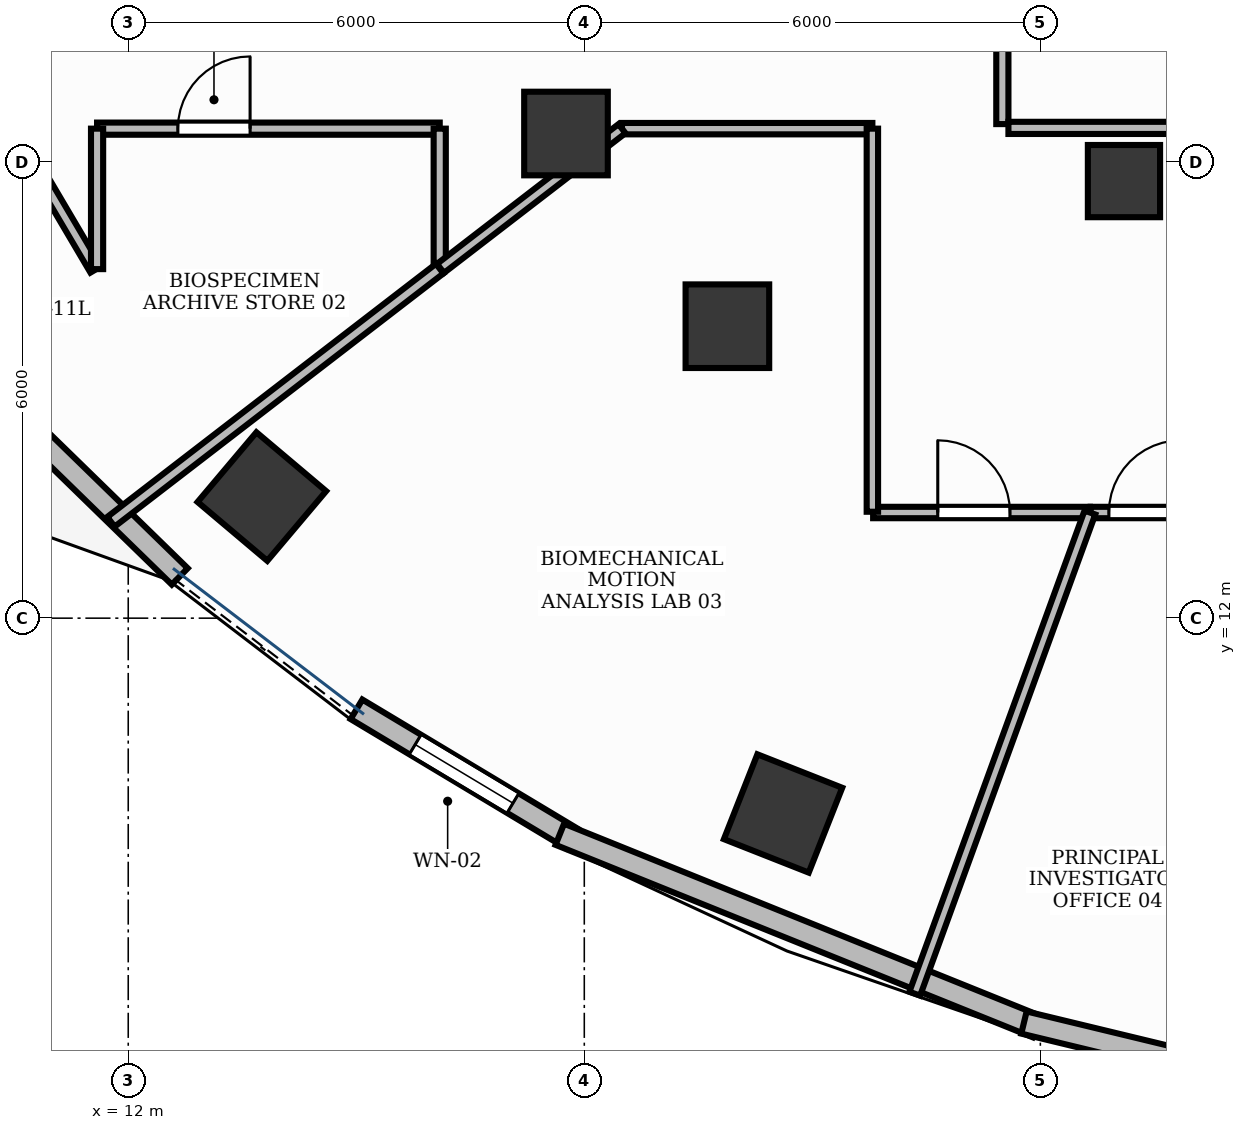
"""IFC4 building model, lengths in metres.
Left out: names, types, materials, properties, quantities, classifications, styles, units other than length and angle.
Written with IfcOpenShell. Run it as: python <this file> out.ifc"""

import sys

from ifc_helpers import new_model, si_unit, direction, frame, frame_2d, origin, origin_2d, place, context, subcontext, project, spatial, rectangle, extrude, element, fill, save


model = new_model("IFC4")
c1 = context("Model", 3, precision=1e-05, world=origin(), true_north=direction((0.0, 1.0)))
c2 = subcontext(c1, "Body", "Model", "MODEL_VIEW")
j1 = project(units=[si_unit("LENGTHUNIT", "METRE"), si_unit("PLANEANGLEUNIT", "RADIAN")], contexts=[c1])
p1 = place(None, origin())
s1 = spatial("IfcSite", under=j1, at=p1, CompositionType="ELEMENT")
p2 = place(p1, origin())
s2 = spatial("IfcBuilding", under=s1, at=p2, CompositionType="ELEMENT")
p3 = place(p2, frame((0.0, 0.0, 115.2)))
s3 = spatial("IfcBuildingStorey", under=s2, at=p3, CompositionType="ELEMENT", Elevation=115.2)
p4 = place(p3, frame((25.1, 17.75, -0.0), z_axis=(0.0, 0.0, 1.0), x_axis=(1.0, 0.0, 0.0)))
e1 = element("IfcColumn", 1, at=p4, inside=s3, PredefinedType="PILASTER", context=c2, shape_type="SweptSolid", body=[
    extrude(rectangle(XDim=0.95, YDim=0.95, at=origin_2d()), origin(), (0.0, 0.0, 1.0), 3.901),
])
p5 = place(p3, frame((17.759, 18.376, -0.0), z_axis=(0.0, 0.0, 1.0), x_axis=(1.0, 0.0, 0.0)))
e2 = element("IfcColumn", 2, at=p5, inside=s3, PredefinedType="COLUMN", context=c2, shape_type="SweptSolid", body=[
    extrude(rectangle(XDim=1.1, YDim=1.1, at=origin_2d()), origin(), (0.0, 0.0, 1.0), 3.901),
])
p6 = place(p3, frame((13.758, 13.6, -0.0), z_axis=(0.0, 0.0, 1.0), x_axis=(-0.764246456939, 0.644924300253, 0.0)))
e3 = element("IfcColumn", 3, at=p6, inside=s3, PredefinedType="COLUMN", context=c2, shape_type="SweptSolid", body=[
    extrude(rectangle(XDim=1.2, YDim=1.2, at=origin_2d()), origin(), (0.0, 0.0, 1.0), 3.901),
])
p7 = place(p3, frame((19.883, 15.841, -0.0), z_axis=(0.0, 0.0, 1.0), x_axis=(1.0, 0.0, 0.0)))
e4 = element("IfcColumn", 4, at=p7, inside=s3, PredefinedType="COLUMN", context=c2, shape_type="SweptSolid", body=[
    extrude(rectangle(XDim=1.1, YDim=1.1, at=origin_2d()), origin(), (0.0, 0.0, 1.0), 3.901),
])
p8 = place(p3, frame((20.615, 9.431, -0.0), z_axis=(0.0, 0.0, 1.0), x_axis=(-0.930225540858, 0.366988341962, 0.0)))
e5 = element("IfcColumn", 5, at=p8, inside=s3, PredefinedType="COLUMN", context=c2, shape_type="SweptSolid", body=[
    extrude(rectangle(XDim=1.2, YDim=1.2, at=origin_2d()), origin(), (0.0, 0.0, 1.0), 3.901),
])
p9 = place(p3, frame((15.003, 10.801, 0.0), z_axis=(0.0, 0.0, 1.0), x_axis=(0.85758429223, -0.514343447242, 0.0)))
e6 = element("IfcWall", 6, at=p9, inside=s3, PredefinedType="STANDARD", context=c2, shape_type="SweptSolid", body=[
    extrude(rectangle(XDim=3.3, YDim=0.3, at=frame_2d((1.65, 0.0))), origin(), (0.0, 0.0, 1.0), 3.9),
])
p10 = place(p9, frame((0.9, 0.0, 0.95)))
e7 = element("IfcOpeningElement", 7, at=p10, cuts=e6, PredefinedType="OPENING", context=c2, shape_type="SweptSolid", body=[
    extrude(rectangle(XDim=1.5, YDim=1.8, at=frame_2d((0.75, 0.9))), frame((0.0, 0.165, 0.0), z_axis=(0.0, -1.0, 0.0), x_axis=(1.0, 0.0, 0.0)), (0.0, 0.0, 1.0), 0.33),
])
p11 = place(p3, frame((10.428, 14.742, 0.0), z_axis=(0.0, 0.0, 1.0), x_axis=(0.716101112291, -0.69799655943, 0.0)))
e8 = element("IfcWall", 8, at=p11, inside=s3, PredefinedType="STANDARD", context=c2, shape_type="SweptSolid", body=[
    extrude(rectangle(XDim=3.142, YDim=0.3, at=frame_2d((1.571, 0.0))), origin(), (0.0, 0.0, 1.0), 3.9),
])
p12 = place(p3, frame((17.678, 9.157, 0.0), z_axis=(0.0, 0.0, 1.0), x_axis=(0.927423312416, -0.374013368194, 0.0)))
e9 = element("IfcWall", 9, at=p12, inside=s3, PredefinedType="STANDARD", context=c2, shape_type="SweptSolid", body=[
    extrude(rectangle(XDim=6.769, YDim=0.3, at=frame_2d((3.385, 0.0))), origin(), (0.0, 0.0, 1.0), 3.47),
])
p13 = place(p3, frame((23.784, 6.68, 0.0), z_axis=(0.0, 0.0, 1.0), x_axis=(0.972043452321, -0.234801036625, 0.0)))
e10 = element("IfcWall", 10, at=p13, inside=s3, PredefinedType="STANDARD", context=c2, shape_type="SweptSolid", body=[
    extrude(rectangle(XDim=3.569, YDim=0.3, at=frame_2d((1.784, 0.0))), origin(), (0.0, 0.0, 1.0), 3.9),
])
p14 = place(p3, frame((23.5, 18.5, 0.0), z_axis=(0.0, 0.0, 1.0), x_axis=(0.0, 1.0, 0.0)))
e11 = element("IfcWall", 11, at=p14, inside=s3, PredefinedType="PARTITIONING", context=c2, shape_type="SweptSolid", body=[
    extrude(rectangle(XDim=3.4, YDim=0.16, at=frame_2d((1.7, 0.0))), origin(), (0.0, 0.0, 1.0), 2.91),
])
p15 = place(p14, frame((1.175, 0.0, 0.0)))
e12 = element("IfcOpeningElement", 12, at=p15, cuts=e11, PredefinedType="OPENING", context=c2, shape_type="SweptSolid", body=[
    extrude(rectangle(XDim=1.05, YDim=2.15, at=frame_2d((0.525, 1.075))), frame((0.0, 0.095, 0.0), z_axis=(0.0, -1.0, 0.0), x_axis=(1.0, 0.0, 0.0)), (0.0, 0.0, 1.0), 0.19),
])
p16 = place(p3, frame((23.58, 18.45, 0.0), z_axis=(0.0, 0.0, 1.0), x_axis=(1.0, 0.0, 0.0)))
e13 = element("IfcWall", 13, at=p16, inside=s3, PredefinedType="PARTITIONING", context=c2, shape_type="SweptSolid", body=[
    extrude(rectangle(XDim=2.12, YDim=0.16, at=frame_2d((1.06, 0.0))), origin(), (0.0, 0.0, 1.0), 2.91),
])
p17 = place(p3, frame((11.59, 18.44, 0.0), z_axis=(0.0, 0.0, 1.0), x_axis=(1.0, 0.0, 0.0)))
e14 = element("IfcWall", 14, at=p17, inside=s3, PredefinedType="PARTITIONING", context=c2, shape_type="SweptSolid", body=[
    extrude(rectangle(XDim=4.508, YDim=0.16, at=frame_2d((2.254, 0.0))), origin(), (0.0, 0.0, 1.0), 2.91),
])
p18 = place(p17, frame((1.063, 0.0, 0.0)))
e15 = element("IfcOpeningElement", 15, at=p18, cuts=e14, PredefinedType="OPENING", context=c2, shape_type="SweptSolid", body=[
    extrude(rectangle(XDim=0.95, YDim=2.15, at=frame_2d((0.475, 1.075))), frame((0.0, 0.095, 0.0), z_axis=(0.0, -1.0, 0.0), x_axis=(1.0, 0.0, 0.0)), (0.0, 0.0, 1.0), 0.19),
])
p19 = place(p3, frame((21.8, 13.39, 0.0), z_axis=(0.0, 0.0, 1.0), x_axis=(1.0, 0.0, 0.0)))
e16 = element("IfcWall", 16, at=p19, inside=s3, PredefinedType="PARTITIONING", context=c2, shape_type="SweptSolid", body=[
    extrude(rectangle(XDim=2.852, YDim=0.15, at=frame_2d((1.426, 0.0))), origin(), (0.0, 0.0, 1.0), 2.91),
])
p20 = place(p19, frame((0.85, 0.0, 0.0)))
e17 = element("IfcOpeningElement", 17, at=p20, cuts=e16, PredefinedType="OPENING", context=c2, shape_type="SweptSolid", body=[
    extrude(rectangle(XDim=0.95, YDim=2.15, at=frame_2d((0.475, 1.075))), frame((0.0, 0.09, 0.0), z_axis=(0.0, -1.0, 0.0), x_axis=(1.0, 0.0, 0.0)), (0.0, 0.0, 1.0), 0.18),
])
p21 = place(p3, frame((24.662, 13.39, 0.0), z_axis=(0.0, 0.0, 1.0), x_axis=(1.0, 0.0, 0.0)))
e18 = element("IfcWall", 18, at=p21, inside=s3, PredefinedType="PARTITIONING", context=c2, shape_type="SweptSolid", body=[
    extrude(rectangle(XDim=2.885, YDim=0.15, at=frame_2d((1.443, 0.0))), origin(), (0.0, 0.0, 1.0), 2.91),
])
p22 = place(p21, frame((0.24, 0.0, 0.0)))
e19 = element("IfcOpeningElement", 19, at=p22, cuts=e18, PredefinedType="OPENING", context=c2, shape_type="SweptSolid", body=[
    extrude(rectangle(XDim=0.95, YDim=2.15, at=frame_2d((0.475, 1.075))), frame((0.0, 0.09, 0.0), z_axis=(0.0, -1.0, 0.0), x_axis=(1.0, 0.0, 0.0)), (0.0, 0.0, 1.0), 0.18),
])
p23 = place(p3, frame((9.359, 20.336, 0.0), z_axis=(0.0, 0.0, 1.0), x_axis=(0.508164254342, -0.86126017591, 0.0)))
e20 = element("IfcWall", 20, at=p23, inside=s3, PredefinedType="PARTITIONING", context=c2, shape_type="SweptSolid", body=[
    extrude(rectangle(XDim=4.353, YDim=0.16, at=frame_2d((2.177, 0.0))), origin(), (0.0, 0.0, 1.0), 2.91),
])
p24 = place(p3, frame((11.59, 16.592, 0.0), z_axis=(0.0, 0.0, 1.0), x_axis=(0.0, 1.0, 0.0)))
e21 = element("IfcWall", 21, at=p24, inside=s3, PredefinedType="PARTITIONING", context=c2, shape_type="SweptSolid", body=[
    extrude(rectangle(XDim=1.848, YDim=0.16, at=frame_2d((0.924, 0.0))), origin(), (0.0, 0.0, 1.0), 2.91),
])
p25 = place(p3, frame((16.098, 18.44, 0.0), z_axis=(0.0, 0.0, 1.0), x_axis=(0.0, -1.0, 0.0)))
e22 = element("IfcWall", 22, at=p25, inside=s3, PredefinedType="PARTITIONING", context=c2, shape_type="SweptSolid", body=[
    extrude(rectangle(XDim=1.841, YDim=0.16, at=frame_2d((0.92, 0.0))), origin(), (0.0, 0.0, 1.0), 2.91),
])
p26 = place(p3, frame((16.098, 16.599, 0.0), z_axis=(0.0, 0.0, 1.0), x_axis=(-0.792293030169, -0.610140766008, 0.0)))
e23 = element("IfcWall", 23, at=p26, inside=s3, PredefinedType="PARTITIONING", context=c2, shape_type="SweptSolid", body=[
    extrude(rectangle(XDim=5.459, YDim=0.16, at=frame_2d((2.729, 0.0))), origin(), (0.0, 0.0, 1.0), 2.91),
])
p27 = place(p3, frame((18.496, 18.44, 0.0), z_axis=(0.0, 0.0, 1.0), x_axis=(1.0, 0.0, 0.0)))
e24 = element("IfcWall", 24, at=p27, inside=s3, PredefinedType="PARTITIONING", context=c2, shape_type="SweptSolid", body=[
    extrude(rectangle(XDim=3.294, YDim=0.15, at=frame_2d((1.647, 0.0))), origin(), (0.0, 0.0, 1.0), 2.91),
])
p28 = place(p3, frame((21.79, 18.44, 0.0), z_axis=(0.0, 0.0, 1.0), x_axis=(0.0, -1.0, 0.0)))
e25 = element("IfcWall", 25, at=p28, inside=s3, PredefinedType="PARTITIONING", context=c2, shape_type="SweptSolid", body=[
    extrude(rectangle(XDim=5.04, YDim=0.15, at=frame_2d((2.52, 0.0))), origin(), (0.0, 0.0, 1.0), 2.91),
])
p29 = place(p3, frame((24.652, 13.39, 0.0), z_axis=(0.0, 0.0, 1.0), x_axis=(-0.342007848086, -0.939697095796, 0.0)))
e26 = element("IfcWall", 26, at=p29, inside=s3, PredefinedType="PARTITIONING", context=c2, shape_type="SweptSolid", body=[
    extrude(rectangle(XDim=6.737, YDim=0.15, at=frame_2d((3.368, 0.0))), origin(), (0.0, 0.0, 1.0), 2.91),
])
p30 = place(p3, frame((16.108, 16.601, 0.0), z_axis=(0.0, 0.0, 1.0), x_axis=(0.792313685483, 0.61011394329, 0.0)))
e27 = element("IfcWall", 27, at=p30, inside=s3, PredefinedType="PARTITIONING", context=c2, shape_type="SweptSolid", body=[
    extrude(rectangle(XDim=3.014, YDim=0.15, at=frame_2d((1.507, 0.0))), origin(), (0.0, 0.0, 1.0), 2.91),
])
p31 = place(p10, origin())
e28 = element("IfcWindow", 28, at=p31, inside=s3, PartitioningType="DOUBLE_PANEL_VERTICAL", PredefinedType="WINDOW", context=c2, shape_type="SweptSolid", body=[
    extrude(rectangle(XDim=1.5, YDim=1.8, at=frame_2d((0.75, 0.9))), frame((0.0, 0.03, 0.0), z_axis=(0.0, -1.0, 0.0), x_axis=(1.0, 0.0, 0.0)), (0.0, 0.0, 1.0), 0.06),
])
fill(e7, e28)
p32 = place(p18, origin())
e29 = element("IfcDoor", 29, at=p32, inside=s3, OperationType="SINGLE_SWING_RIGHT", PredefinedType="DOOR", context=c2, shape_type="SweptSolid", body=[
    extrude(rectangle(XDim=0.95, YDim=2.15, at=frame_2d((0.475, 1.075))), frame((0.0, 0.025, 0.0), z_axis=(0.0, -1.0, 0.0), x_axis=(1.0, 0.0, 0.0)), (0.0, 0.0, 1.0), 0.05),
])
fill(e15, e29)
p33 = place(p20, origin())
e30 = element("IfcDoor", 30, at=p33, inside=s3, OperationType="SINGLE_SWING_LEFT", PredefinedType="DOOR", context=c2, shape_type="SweptSolid", body=[
    extrude(rectangle(XDim=0.95, YDim=2.15, at=frame_2d((0.475, 1.075))), frame((0.0, 0.025, 0.0), z_axis=(0.0, -1.0, 0.0), x_axis=(1.0, 0.0, 0.0)), (0.0, 0.0, 1.0), 0.05),
])
fill(e17, e30)
p34 = place(p22, origin())
e31 = element("IfcDoor", 31, at=p34, inside=s3, OperationType="SINGLE_SWING_RIGHT", PredefinedType="DOOR", context=c2, shape_type="SweptSolid", body=[
    extrude(rectangle(XDim=0.95, YDim=2.15, at=frame_2d((0.475, 1.075))), frame((0.0, 0.025, 0.0), z_axis=(0.0, -1.0, 0.0), x_axis=(1.0, 0.0, 0.0)), (0.0, 0.0, 1.0), 0.05),
])
fill(e19, e31)
save(model, sys.argv[1])
